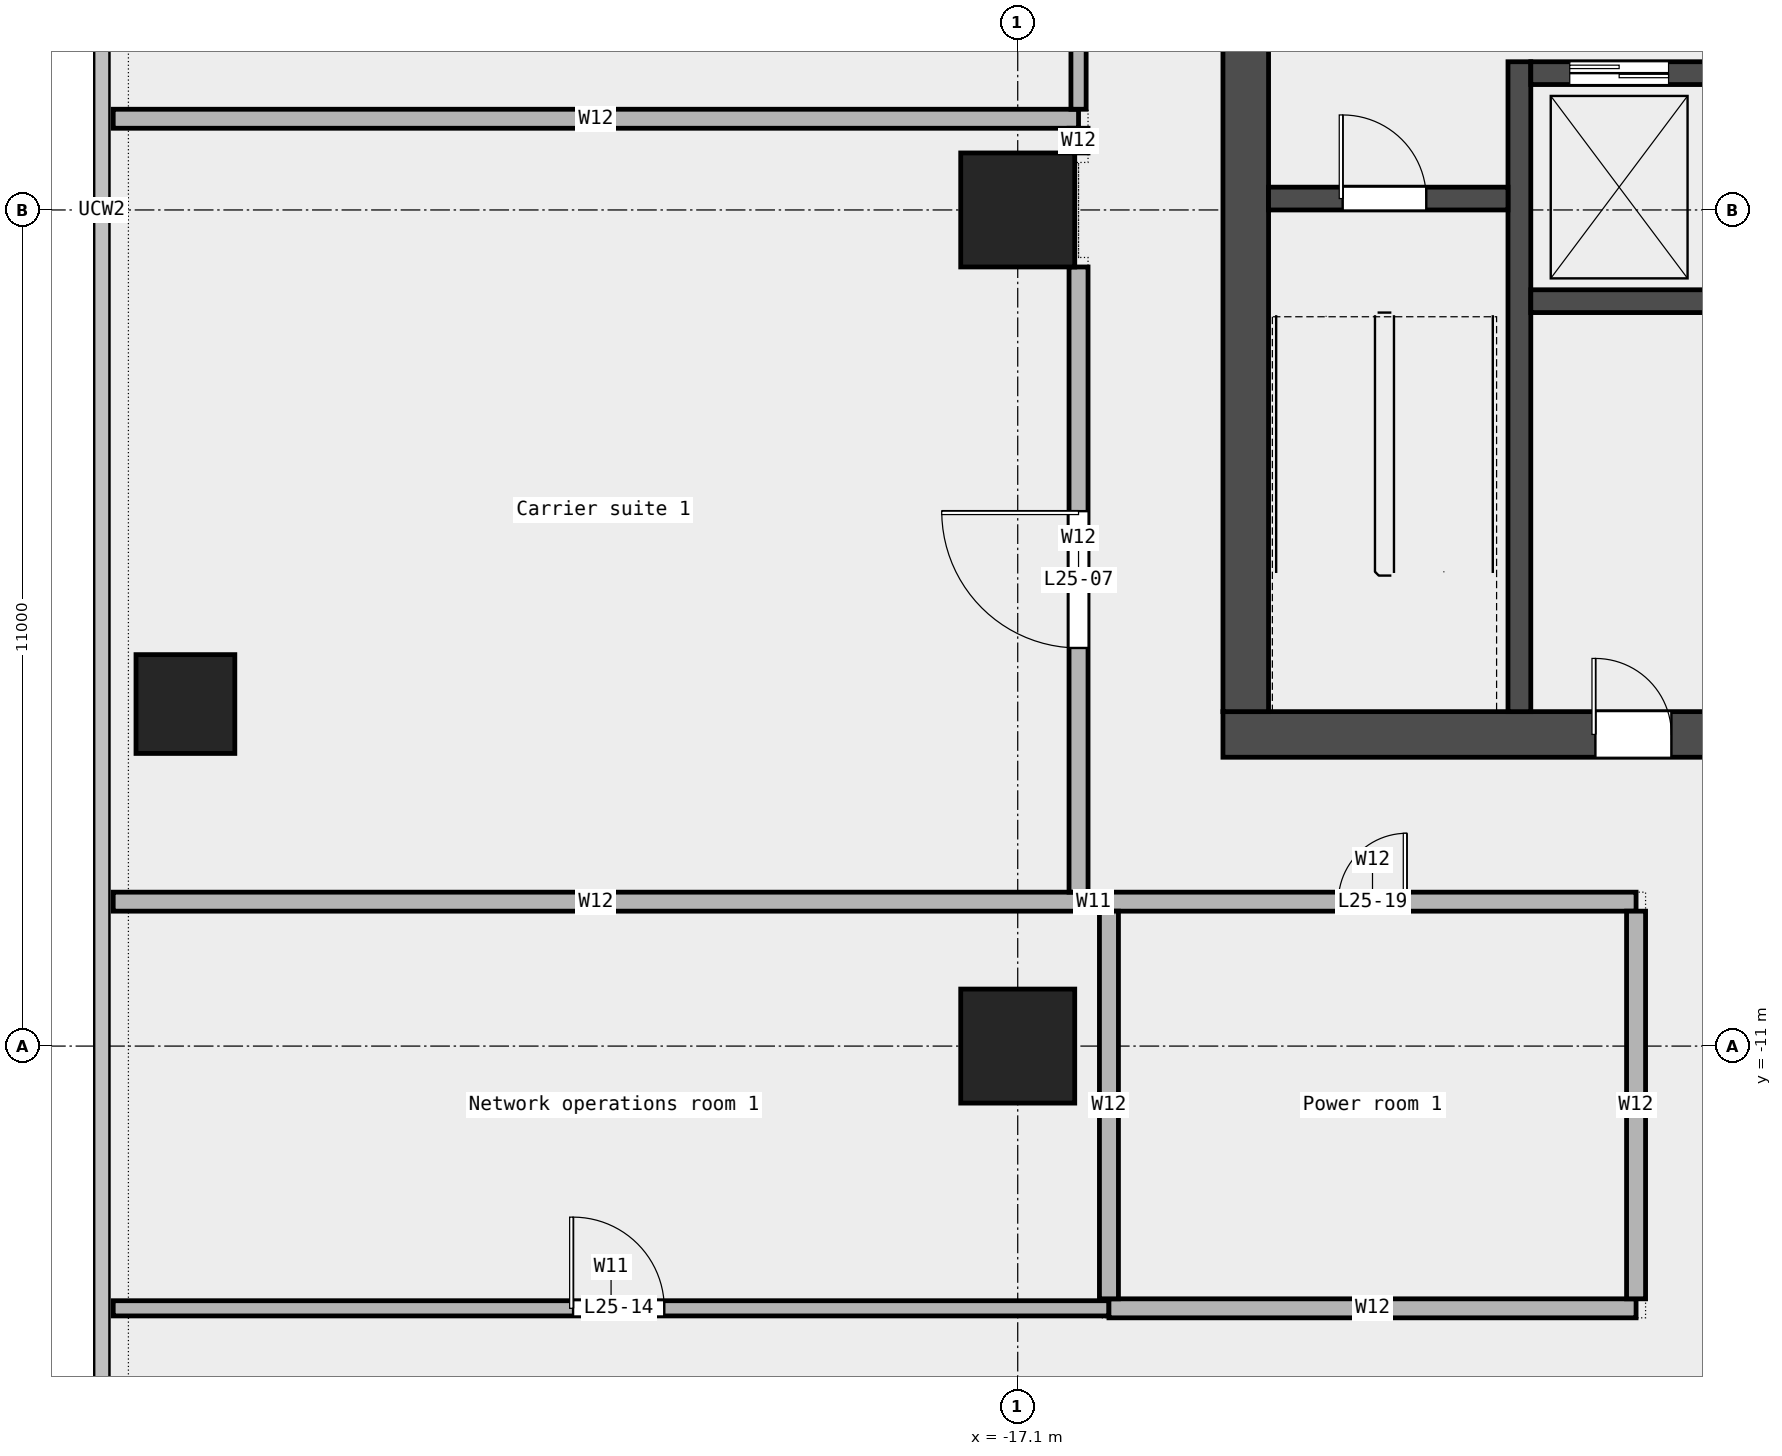
"""IFC4 building model, lengths in metres.
Left out: names, types, materials, properties, quantities, classifications, styles, units other than length and angle.
Written with IfcOpenShell. Run it as: python <this file> out.ifc"""

import sys

from ifc_helpers import new_model, si_unit, direction, frame, frame_2d, origin, origin_2d, place, context, subcontext, project, spatial, rectangle, extrude, element, fill, save


model = new_model("IFC4")
c1 = context("Model", 3, precision=1e-05, world=origin(), true_north=direction((0.0, 1.0)))
c2 = subcontext(c1, "Body", "Model", "MODEL_VIEW")
j1 = project(units=[si_unit("LENGTHUNIT", "METRE"), si_unit("PLANEANGLEUNIT", "RADIAN")], contexts=[c1])
p1 = place(None, origin())
s1 = spatial("IfcSite", under=j1, at=p1, CompositionType="ELEMENT")
p2 = place(p1, origin())
s2 = spatial("IfcBuilding", under=s1, at=p2, CompositionType="ELEMENT")
p3 = place(p2, frame((0.0, 0.0, 126.1)))
s3 = spatial("IfcBuildingStorey", under=s2, at=p3, CompositionType="ELEMENT", Elevation=126.1)
p4 = place(p3, frame((-28.05, -6.5, 0.0), z_axis=(0.0, 0.0, 1.0), x_axis=(1.0, 0.0, 0.0)))
e1 = element("IfcColumn", 1, at=p4, inside=s3, PredefinedType="COLUMN", context=c2, shape_type="SweptSolid", body=[
    extrude(rectangle(XDim=1.3, YDim=1.3, at=origin_2d()), origin(), (0.0, 0.0, 1.0), 4.05),
])
for number, where, z_axis, x_axis in (
    (2, (-17.1, -11.0, 0.0), (0.0, 0.0, 1.0), (1.0, 0.0, 0.0)),
    (3, (-17.1, 0.0, 0.0), (0.0, 0.0, 1.0), (1.0, 0.0, 0.0)),
):
    element("IfcColumn", number, at=place(p3, frame(where, z_axis=z_axis, x_axis=x_axis)), inside=s3, PredefinedType="COLUMN", context=c2, shape_type="SweptSolid", body=[
        extrude(rectangle(XDim=1.5, YDim=1.5, at=origin_2d()), origin(), (0.0, 0.0, 1.0), 4.05),
    ])
p5 = place(p3, frame((-29.0, -14.45, 0.0), z_axis=(0.0, 0.0, 1.0), x_axis=(1.0, 0.0, 0.0)))
e4 = element("IfcWall", 4, at=p5, inside=s3, PredefinedType="PARTITIONING", context=c2, shape_type="SweptSolid", body=[
    extrude(rectangle(XDim=13.1, YDim=0.2, at=frame_2d((6.55, 0.0))), origin(), (0.0, 0.0, 1.0), 4.05),
])
p6 = place(p5, frame((6.05, 0.0, 0.0)))
e5 = element("IfcOpeningElement", 5, at=p6, cuts=e4, PredefinedType="OPENING", context=c2, shape_type="SweptSolid", body=[
    extrude(rectangle(XDim=1.2, YDim=2.1, at=frame_2d((0.6, 1.05))), frame((0.0, 0.112, 0.0), z_axis=(0.0, -1.0, 0.0), x_axis=(1.0, 0.0, 0.0)), (0.0, 0.0, 1.0), 0.224),
])
p7 = place(p3, frame((-15.9, -14.45, 0.0), z_axis=(0.0, 0.0, 1.0), x_axis=(1.0, 0.0, 0.0)))
e6 = element("IfcWall", 6, at=p7, inside=s3, PredefinedType="PARTITIONING", context=c2, shape_type="SweptSolid", body=[
    extrude(rectangle(XDim=6.935, YDim=0.25, at=frame_2d((3.467, 0.0))), origin(), (0.0, 0.0, 1.0), 4.05),
])
p8 = place(p3, frame((-16.3, -9.1, 0.0), z_axis=(0.0, 0.0, 1.0), x_axis=(1.0, 0.0, 0.0)))
e7 = element("IfcWall", 7, at=p8, inside=s3, PredefinedType="PARTITIONING", context=c2, shape_type="SweptSolid", body=[
    extrude(rectangle(XDim=0.4, YDim=0.2, at=frame_2d((0.2, 0.0))), origin(), (0.0, 0.0, 1.0), 4.05),
])
p9 = place(p3, frame((-29.0, -9.1, 0.0), z_axis=(0.0, 0.0, 1.0), x_axis=(1.0, 0.0, 0.0)))
e8 = element("IfcWall", 8, at=p9, inside=s3, PredefinedType="PARTITIONING", context=c2, shape_type="SweptSolid", body=[
    extrude(rectangle(XDim=12.7, YDim=0.25, at=frame_2d((6.35, 0.0))), origin(), (0.0, 0.0, 1.0), 4.05),
])
p10 = place(p3, frame((-15.9, -9.1, 0.0), z_axis=(0.0, 0.0, 1.0), x_axis=(1.0, 0.0, 0.0)))
e9 = element("IfcWall", 9, at=p10, inside=s3, PredefinedType="PARTITIONING", context=c2, shape_type="SweptSolid", body=[
    extrude(rectangle(XDim=6.935, YDim=0.25, at=frame_2d((3.467, 0.0))), origin(), (0.0, 0.0, 1.0), 4.05),
])
p11 = place(p10, frame((3.018, 0.0, 0.0)))
e10 = element("IfcOpeningElement", 10, at=p11, cuts=e9, PredefinedType="OPENING", context=c2, shape_type="SweptSolid", body=[
    extrude(rectangle(XDim=0.9, YDim=2.1, at=frame_2d((0.45, 1.05))), frame((0.0, 0.137, 0.0), z_axis=(0.0, -1.0, 0.0), x_axis=(1.0, 0.0, 0.0)), (0.0, 0.0, 1.0), 0.274),
])
p12 = place(p3, frame((-29.0, 1.2, 0.0), z_axis=(0.0, 0.0, 1.0), x_axis=(1.0, 0.0, 0.0)))
e11 = element("IfcWall", 11, at=p12, inside=s3, PredefinedType="PARTITIONING", context=c2, shape_type="SweptSolid", body=[
    extrude(rectangle(XDim=12.7, YDim=0.25, at=frame_2d((6.35, 0.0))), origin(), (0.0, 0.0, 1.0), 4.05),
])
p13 = place(p3, frame((-16.3, 1.325, 0.0), z_axis=(0.0, 0.0, 1.0), x_axis=(0.0, 1.0, 0.0)))
e12 = element("IfcWall", 12, at=p13, inside=s3, PredefinedType="PARTITIONING", context=c2, shape_type="SweptSolid", body=[
    extrude(rectangle(XDim=8.925, YDim=0.2, at=frame_2d((4.462, 0.0))), origin(), (0.0, 0.0, 1.0), 4.05),
])
p14 = place(p13, frame((3.562, 0.0, 0.0)))
e13 = element("IfcOpeningElement", 13, at=p14, cuts=e12, PredefinedType="OPENING", context=c2, shape_type="SweptSolid", body=[
    extrude(rectangle(XDim=1.8, YDim=2.1, at=frame_2d((0.9, 1.05))), frame((0.0, 0.112, 0.0), z_axis=(0.0, -1.0, 0.0), x_axis=(1.0, 0.0, 0.0)), (0.0, 0.0, 1.0), 0.224),
])
p15 = place(p3, frame((-16.3, -8.975, 0.0), z_axis=(0.0, 0.0, 1.0), x_axis=(0.0, 1.0, 0.0)))
e14 = element("IfcWall", 14, at=p15, inside=s3, PredefinedType="PARTITIONING", context=c2, shape_type="SweptSolid", body=[
    extrude(rectangle(XDim=8.225, YDim=0.25, at=frame_2d((4.113, 0.0))), origin(), (0.0, 0.0, 1.0), 4.05),
])
p16 = place(p15, frame((3.212, 0.0, 0.0)))
e15 = element("IfcOpeningElement", 15, at=p16, cuts=e14, PredefinedType="OPENING", context=c2, shape_type="SweptSolid", body=[
    extrude(rectangle(XDim=1.8, YDim=2.1, at=frame_2d((0.9, 1.05))), frame((0.0, 0.137, 0.0), z_axis=(0.0, -1.0, 0.0), x_axis=(1.0, 0.0, 0.0)), (0.0, 0.0, 1.0), 0.274),
])
p17 = place(p3, frame((-16.3, 0.75, 0.0), z_axis=(0.0, 0.0, 1.0), x_axis=(0.0, 1.0, 0.0)))
e16 = element("IfcWall", 16, at=p17, inside=s3, PredefinedType="PARTITIONING", context=c2, shape_type="SweptSolid", body=[
    extrude(rectangle(XDim=0.325, YDim=0.25, at=frame_2d((0.163, 0.0))), origin(), (0.0, 0.0, 1.0), 4.05),
])
for number, where, z_axis, x_axis in (
    (17, (-15.9, -14.325, 0.0), (0.0, 0.0, 1.0), (0.0, 1.0, 0.0)),
    (18, (-8.965, -14.325, 0.0), (0.0, 0.0, 1.0), (0.0, 1.0, 0.0)),
):
    element("IfcWall", number, at=place(p3, frame(where, z_axis=z_axis, x_axis=x_axis)), inside=s3, PredefinedType="PARTITIONING", context=c2, shape_type="SweptSolid", body=[
        extrude(rectangle(XDim=5.1, YDim=0.25, at=frame_2d((2.55, 0.0))), origin(), (0.0, 0.0, 1.0), 4.05),
    ])
p18 = place(p3, frame((-14.4, -6.9, 0.0), z_axis=(0.0, 0.0, 1.0), x_axis=(1.0, 0.0, 0.0)))
e19 = element("IfcWall", 19, at=p18, inside=s3, PredefinedType="SHEAR", context=c2, shape_type="SweptSolid", body=[
    extrude(rectangle(XDim=28.8, YDim=0.6, at=frame_2d((14.4, 0.0))), origin(), (0.0, 0.0, 1.0), 4.2),
])
p19 = place(p18, frame((4.9, 0.0, 0.0)))
e20 = element("IfcOpeningElement", 20, at=p19, cuts=e19, PredefinedType="OPENING", context=c2, shape_type="SweptSolid", body=[
    extrude(rectangle(XDim=1.0, YDim=2.1, at=frame_2d((0.5, 1.05))), frame((0.0, 0.312, 0.0), z_axis=(0.0, -1.0, 0.0), x_axis=(1.0, 0.0, 0.0)), (0.0, 0.0, 1.0), 0.624),
])
p20 = place(p18, frame((9.675, 0.0, 0.0)))
e21 = element("IfcOpeningElement", 21, at=p20, cuts=e19, PredefinedType="OPENING", context=c2, shape_type="SweptSolid", body=[
    extrude(rectangle(XDim=1.2, YDim=2.1, at=frame_2d((0.6, 1.05))), frame((0.0, 0.312, 0.0), z_axis=(0.0, -1.0, 0.0), x_axis=(1.0, 0.0, 0.0)), (0.0, 0.0, 1.0), 0.624),
])
p21 = place(p18, frame((14.837, 0.0, 0.0)))
e22 = element("IfcOpeningElement", 22, at=p21, cuts=e19, PredefinedType="OPENING", context=c2, shape_type="SweptSolid", body=[
    extrude(rectangle(XDim=1.0, YDim=2.1, at=frame_2d((0.5, 1.05))), frame((0.0, 0.312, 0.0), z_axis=(0.0, -1.0, 0.0), x_axis=(1.0, 0.0, 0.0)), (0.0, 0.0, 1.0), 0.624),
])
p22 = place(p18, frame((18.75, 0.0, 0.0)))
e23 = element("IfcOpeningElement", 23, at=p22, cuts=e19, PredefinedType="OPENING", context=c2, shape_type="SweptSolid", body=[
    extrude(rectangle(XDim=1.8, YDim=2.1, at=frame_2d((0.9, 1.05))), frame((0.0, 0.312, 0.0), z_axis=(0.0, -1.0, 0.0), x_axis=(1.0, 0.0, 0.0)), (0.0, 0.0, 1.0), 0.624),
])
p23 = place(p18, frame((23.087, 0.0, 0.0)))
e24 = element("IfcOpeningElement", 24, at=p23, cuts=e19, PredefinedType="OPENING", context=c2, shape_type="SweptSolid", body=[
    extrude(rectangle(XDim=1.0, YDim=2.1, at=frame_2d((0.5, 1.05))), frame((0.0, 0.312, 0.0), z_axis=(0.0, -1.0, 0.0), x_axis=(1.0, 0.0, 0.0)), (0.0, 0.0, 1.0), 0.624),
])
p24 = place(p3, frame((-14.1, -6.6, 0.0), z_axis=(0.0, 0.0, 1.0), x_axis=(0.0, 1.0, 0.0)))
e25 = element("IfcWall", 25, at=p24, inside=s3, PredefinedType="SHEAR", context=c2, shape_type="SweptSolid", body=[
    extrude(rectangle(XDim=19.5, YDim=0.6, at=frame_2d((9.75, 0.0))), origin(), (0.0, 0.0, 1.0), 4.2),
])
p25 = place(p24, frame((9.3, 0.0, 0.0)))
e26 = element("IfcOpeningElement", 26, at=p25, cuts=e25, PredefinedType="OPENING", context=c2, shape_type="SweptSolid", body=[
    extrude(rectangle(XDim=1.8, YDim=2.1, at=frame_2d((0.9, 1.05))), frame((0.0, 0.312, 0.0), z_axis=(0.0, -1.0, 0.0), x_axis=(1.0, 0.0, 0.0)), (0.0, 0.0, 1.0), 0.624),
])
p26 = place(p3, frame((-10.5, -6.6, 0.0), z_axis=(0.0, 0.0, 1.0), x_axis=(0.0, 1.0, 0.0)))
e27 = element("IfcWall", 27, at=p26, inside=s3, PredefinedType="SHEAR", context=c2, shape_type="SweptSolid", body=[
    extrude(rectangle(XDim=8.55, YDim=0.3, at=frame_2d((4.275, 0.0))), origin(), (0.0, 0.0, 1.0), 4.2),
])
p27 = place(p3, frame((-13.8, 0.15, 0.0), z_axis=(0.0, 0.0, 1.0), x_axis=(1.0, 0.0, 0.0)))
e28 = element("IfcWall", 28, at=p27, inside=s3, PredefinedType="SOLIDWALL", context=c2, shape_type="SweptSolid", body=[
    extrude(rectangle(XDim=3.15, YDim=0.3, at=frame_2d((1.575, 0.0))), origin(), (0.0, 0.0, 1.0), 4.2),
])
p28 = place(p27, frame((0.975, 0.0, 0.0)))
e29 = element("IfcOpeningElement", 29, at=p28, cuts=e28, PredefinedType="OPENING", context=c2, shape_type="SweptSolid", body=[
    extrude(rectangle(XDim=1.1, YDim=2.1, at=frame_2d((0.55, 1.05))), frame((0.0, 0.162, 0.0), z_axis=(0.0, -1.0, 0.0), x_axis=(1.0, 0.0, 0.0)), (0.0, 0.0, 1.0), 0.324),
])
p29 = place(p3, frame((-10.35, -1.2, 0.0), z_axis=(0.0, 0.0, 1.0), x_axis=(1.0, 0.0, 0.0)))
e30 = element("IfcWall", 30, at=p29, inside=s3, PredefinedType="SOLIDWALL", context=c2, shape_type="SweptSolid", body=[
    extrude(rectangle(XDim=20.7, YDim=0.3, at=frame_2d((10.35, 0.0))), origin(), (0.0, 0.0, 1.0), 4.2),
])
p30 = place(p3, frame((-10.35, 1.8, 0.0), z_axis=(0.0, 0.0, 1.0), x_axis=(1.0, 0.0, 0.0)))
e31 = element("IfcWall", 31, at=p30, inside=s3, PredefinedType="SOLIDWALL", context=c2, shape_type="SweptSolid", body=[
    extrude(rectangle(XDim=20.7, YDim=0.3, at=frame_2d((10.35, 0.0))), origin(), (0.0, 0.0, 1.0), 4.2),
])
p31 = place(p30, frame((0.512, 0.0, 0.0)))
e32 = element("IfcOpeningElement", 32, at=p31, cuts=e31, PredefinedType="OPENING", context=c2, shape_type="SweptSolid", body=[
    extrude(rectangle(XDim=1.3, YDim=2.1, at=frame_2d((0.65, 1.05))), frame((0.0, 0.162, 0.0), z_axis=(0.0, -1.0, 0.0), x_axis=(1.0, 0.0, 0.0)), (0.0, 0.0, 1.0), 0.324),
])
p32 = place(p30, frame((5.863, 0.0, 0.0)))
e33 = element("IfcOpeningElement", 33, at=p32, cuts=e31, PredefinedType="OPENING", context=c2, shape_type="SweptSolid", body=[
    extrude(rectangle(XDim=1.1, YDim=2.1, at=frame_2d((0.55, 1.05))), frame((0.0, 0.162, 0.0), z_axis=(0.0, -1.0, 0.0), x_axis=(1.0, 0.0, 0.0)), (0.0, 0.0, 1.0), 0.324),
])
p33 = place(p30, frame((8.488, 0.0, 0.0)))
e34 = element("IfcOpeningElement", 34, at=p33, cuts=e31, PredefinedType="OPENING", context=c2, shape_type="SweptSolid", body=[
    extrude(rectangle(XDim=1.1, YDim=2.1, at=frame_2d((0.55, 1.05))), frame((0.0, 0.162, 0.0), z_axis=(0.0, -1.0, 0.0), x_axis=(1.0, 0.0, 0.0)), (0.0, 0.0, 1.0), 0.324),
])
p34 = place(p30, frame((11.113, 0.0, 0.0)))
e35 = element("IfcOpeningElement", 35, at=p34, cuts=e31, PredefinedType="OPENING", context=c2, shape_type="SweptSolid", body=[
    extrude(rectangle(XDim=1.1, YDim=2.1, at=frame_2d((0.55, 1.05))), frame((0.0, 0.162, 0.0), z_axis=(0.0, -1.0, 0.0), x_axis=(1.0, 0.0, 0.0)), (0.0, 0.0, 1.0), 0.324),
])
p35 = place(p30, frame((13.738, 0.0, 0.0)))
e36 = element("IfcOpeningElement", 36, at=p35, cuts=e31, PredefinedType="OPENING", context=c2, shape_type="SweptSolid", body=[
    extrude(rectangle(XDim=1.1, YDim=2.1, at=frame_2d((0.55, 1.05))), frame((0.0, 0.162, 0.0), z_axis=(0.0, -1.0, 0.0), x_axis=(1.0, 0.0, 0.0)), (0.0, 0.0, 1.0), 0.324),
])
p36 = place(p30, frame((16.363, 0.0, 0.0)))
e37 = element("IfcOpeningElement", 37, at=p36, cuts=e31, PredefinedType="OPENING", context=c2, shape_type="SweptSolid", body=[
    extrude(rectangle(XDim=1.1, YDim=2.1, at=frame_2d((0.55, 1.05))), frame((0.0, 0.162, 0.0), z_axis=(0.0, -1.0, 0.0), x_axis=(1.0, 0.0, 0.0)), (0.0, 0.0, 1.0), 0.324),
])
p37 = place(p30, frame((18.988, 0.0, 0.0)))
e38 = element("IfcOpeningElement", 38, at=p37, cuts=e31, PredefinedType="OPENING", context=c2, shape_type="SweptSolid", body=[
    extrude(rectangle(XDim=1.1, YDim=2.1, at=frame_2d((0.55, 1.05))), frame((0.0, 0.162, 0.0), z_axis=(0.0, -1.0, 0.0), x_axis=(1.0, 0.0, 0.0)), (0.0, 0.0, 1.0), 0.324),
])
p38 = place(p16, origin())
e39 = element("IfcDoor", 39, at=p38, inside=s3, OperationType="DOUBLE_DOOR_SINGLE_SWING", PredefinedType="DOOR", context=c2, shape_type="SweptSolid", body=[
    extrude(rectangle(XDim=1.8, YDim=2.1, at=frame_2d((0.9, 1.05))), frame((0.0, 0.025, 0.0), z_axis=(0.0, -1.0, 0.0), x_axis=(1.0, 0.0, 0.0)), (0.0, 0.0, 1.0), 0.05),
])
fill(e15, e39)
p39 = place(p6, origin())
e40 = element("IfcDoor", 40, at=p39, inside=s3, OperationType="SINGLE_SWING_LEFT", PredefinedType="DOOR", context=c2, shape_type="SweptSolid", body=[
    extrude(rectangle(XDim=1.2, YDim=2.1, at=frame_2d((0.6, 1.05))), frame((0.0, 0.025, 0.0), z_axis=(0.0, -1.0, 0.0), x_axis=(1.0, 0.0, 0.0)), (0.0, 0.0, 1.0), 0.05),
])
fill(e5, e40)
p40 = place(p11, origin())
e41 = element("IfcDoor", 41, at=p40, inside=s3, OperationType="SINGLE_SWING_RIGHT", PredefinedType="DOOR", context=c2, shape_type="SweptSolid", body=[
    extrude(rectangle(XDim=0.9, YDim=2.1, at=frame_2d((0.45, 1.05))), frame((0.0, 0.025, 0.0), z_axis=(0.0, -1.0, 0.0), x_axis=(1.0, 0.0, 0.0)), (0.0, 0.0, 1.0), 0.05),
])
fill(e10, e41)
p41 = place(p28, origin())
e42 = element("IfcDoor", 42, at=p41, inside=s3, OperationType="SINGLE_SWING_LEFT", PredefinedType="DOOR", context=c2, shape_type="SweptSolid", body=[
    extrude(rectangle(XDim=1.1, YDim=2.1, at=frame_2d((0.55, 1.05))), frame((0.0, 0.025, 0.0), z_axis=(0.0, -1.0, 0.0), x_axis=(1.0, 0.0, 0.0)), (0.0, 0.0, 1.0), 0.05),
])
fill(e29, e42)
p42 = place(p31, origin())
e43 = element("IfcDoor", 43, at=p42, inside=s3, OperationType="DOUBLE_DOOR_SLIDING", PredefinedType="DOOR", context=c2, shape_type="SweptSolid", body=[
    extrude(rectangle(XDim=1.3, YDim=2.1, at=frame_2d((0.65, 1.05))), frame((0.0, 0.025, 0.0), z_axis=(0.0, -1.0, 0.0), x_axis=(1.0, 0.0, 0.0)), (0.0, 0.0, 1.0), 0.05),
])
fill(e32, e43)
p43 = place(p19, origin())
e44 = element("IfcDoor", 44, at=p43, inside=s3, OperationType="SINGLE_SWING_LEFT", PredefinedType="DOOR", context=c2, shape_type="SweptSolid", body=[
    extrude(rectangle(XDim=1.0, YDim=2.1, at=frame_2d((0.5, 1.05))), frame((0.0, 0.025, 0.0), z_axis=(0.0, -1.0, 0.0), x_axis=(1.0, 0.0, 0.0)), (0.0, 0.0, 1.0), 0.05),
])
fill(e20, e44)
save(model, sys.argv[1])
